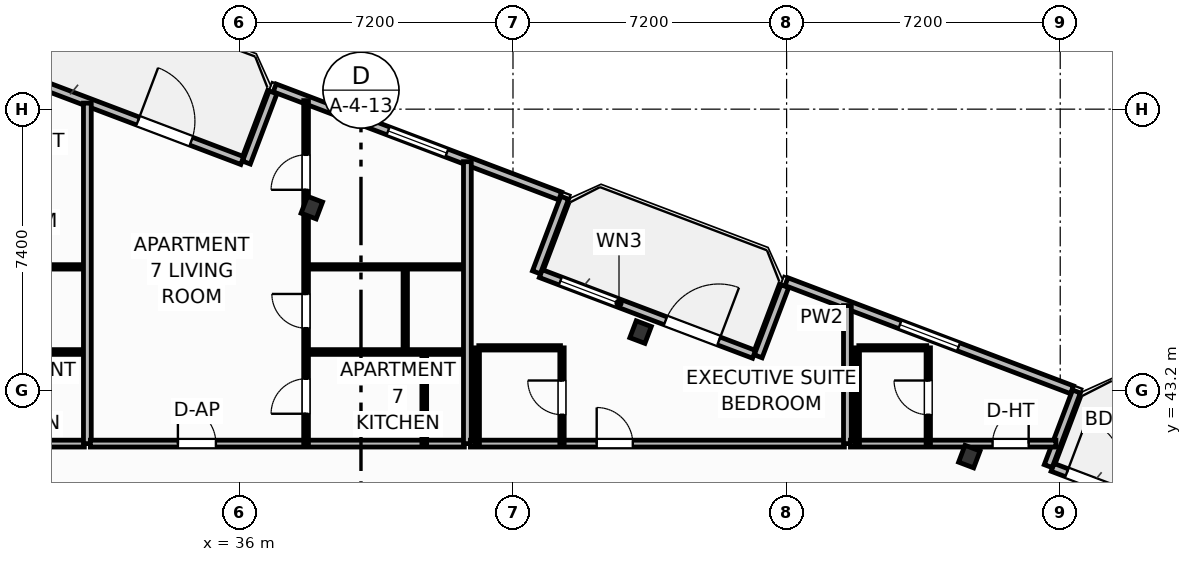
"""IFC4 building model, lengths in metres.
Left out: names, types, materials, properties, quantities, classifications, styles, units other than length and angle.
Written with IfcOpenShell. Run it as: python <this file> out.ifc"""

import sys

from ifc_helpers import new_model, si_unit, direction, frame, frame_2d, origin, origin_2d, place, context, subcontext, project, spatial, rectangle, i_section, extrude, element, fill, save


model = new_model("IFC4")
c1 = context("Model", 3, precision=1e-05, world=origin(), true_north=direction((0.0, 1.0)))
c2 = subcontext(c1, "Body", "Model", "MODEL_VIEW")
j1 = project(units=[si_unit("LENGTHUNIT", "METRE"), si_unit("PLANEANGLEUNIT", "RADIAN")], contexts=[c1])
p1 = place(None, origin())
s1 = spatial("IfcSite", under=j1, at=p1, CompositionType="ELEMENT")
p2 = place(p1, origin())
s2 = spatial("IfcBuilding", under=s1, at=p2, CompositionType="ELEMENT")
p3 = place(p2, frame((0.0, 0.0, 105.8)))
s3 = spatial("IfcBuildingStorey", under=s2, at=p3, CompositionType="ELEMENT", Elevation=105.8)
for number, where, z_axis, x_axis in (
    (1, (55.208, 41.459, 0.0), (0.0, 0.0, 1.0), (0.935, -0.354, 0.0)),
    (2, (46.557, 44.734, 0.0), (0.0, 0.0, 1.0), (0.935, -0.354, 0.0)),
    (3, (37.906, 48.009, 0.0), (0.0, 0.0, 1.0), (0.935, -0.354, 0.0)),
):
    element("IfcColumn", number, at=place(p3, frame(where, z_axis=z_axis, x_axis=x_axis)), inside=s3, PredefinedType="COLUMN", context=c2, shape_type="SweptSolid", body=[
        extrude(i_section(OverallWidth=0.424, OverallDepth=0.474, WebThickness=0.048, FlangeThickness=0.077, FilletRadius=0.025, at=origin_2d()), origin(), (0.0, 0.0, 1.0), 3.7),
    ])
p4 = place(p3, frame((30.465, 51.372, 0.0), z_axis=(0.0, 0.0, 1.0), x_axis=(0.935227640088, -0.354046976001, 0.0)))
e4 = element("IfcWall", 4, at=p4, inside=s3, PredefinedType="SOLIDWALL", context=c2, shape_type="SweptSolid", body=[
    extrude(rectangle(XDim=6.0, YDim=0.22, at=frame_2d((3.0, 0.0))), origin(), (0.0, 0.0, 1.0), 2.73),
])
p5 = place(p4, frame((3.064, 0.0, 0.0)))
e5 = element("IfcOpeningElement", 5, at=p5, cuts=e4, PredefinedType="OPENING", context=c2, shape_type="SweptSolid", body=[
    extrude(rectangle(XDim=1.5, YDim=2.25, at=frame_2d((0.75, 1.125))), frame((0.0, 0.12, 0.0), z_axis=(0.0, -1.0, 0.0), x_axis=(1.0, 0.0, 0.0)), (0.0, 0.0, 1.0), 0.24),
])
p6 = place(p3, frame((43.932, 46.273, 0.0), z_axis=(0.0, 0.0, 1.0), x_axis=(0.93521416643, -0.354082565101, 0.0)))
e6 = element("IfcWall", 6, at=p6, inside=s3, PredefinedType="SOLIDWALL", context=c2, shape_type="SweptSolid", body=[
    extrude(rectangle(XDim=6.0, YDim=0.22, at=frame_2d((3.0, 0.0))), origin(), (0.0, 0.0, 1.0), 2.73),
])
p7 = place(p6, frame((3.508, 0.0, 0.0)))
e7 = element("IfcOpeningElement", 7, at=p7, cuts=e6, PredefinedType="OPENING", context=c2, shape_type="SweptSolid", body=[
    extrude(rectangle(XDim=1.5, YDim=2.25, at=frame_2d((0.75, 1.125))), frame((0.0, 0.12, 0.0), z_axis=(0.0, -1.0, 0.0), x_axis=(1.0, 0.0, 0.0)), (0.0, 0.0, 1.0), 0.24),
])
p8 = place(p6, frame((0.55, 0.0, 0.75)))
e8 = element("IfcOpeningElement", 8, at=p8, cuts=e6, PredefinedType="OPENING", context=c2, shape_type="SweptSolid", body=[
    extrude(rectangle(XDim=1.65, YDim=1.65, at=frame_2d((0.825, 0.825))), frame((0.0, 0.12, 0.0), z_axis=(0.0, -1.0, 0.0), x_axis=(1.0, 0.0, 0.0)), (0.0, 0.0, 1.0), 0.24),
])
p9 = place(p3, frame((57.399, 41.175, 0.0), z_axis=(0.0, 0.0, 1.0), x_axis=(0.935227640088, -0.354046976001, 0.0)))
e9 = element("IfcWall", 9, at=p9, inside=s3, PredefinedType="SOLIDWALL", context=c2, shape_type="SweptSolid", body=[
    extrude(rectangle(XDim=6.0, YDim=0.22, at=frame_2d((3.0, 0.0))), origin(), (0.0, 0.0, 1.0), 2.73),
])
p10 = place(p9, frame((0.4, 0.0, 0.0)))
e10 = element("IfcOpeningElement", 10, at=p10, cuts=e9, PredefinedType="OPENING", context=c2, shape_type="SweptSolid", body=[
    extrude(rectangle(XDim=1.5, YDim=2.25, at=frame_2d((0.75, 1.125))), frame((0.0, 0.12, 0.0), z_axis=(0.0, -1.0, 0.0), x_axis=(1.0, 0.0, 0.0)), (0.0, 0.0, 1.0), 0.24),
])
p11 = place(p3, frame((57.284, 41.208, 0.0), z_axis=(0.0, 0.0, 1.0), x_axis=(0.354128469405, 0.935196785258, 0.0)))
e11 = element("IfcWall", 11, at=p11, inside=s3, PredefinedType="SOLIDWALL", context=c2, shape_type="SweptSolid", body=[
    extrude(rectangle(XDim=2.1, YDim=0.22, at=frame_2d((1.05, 0.0))), origin(), (0.0, 0.0, 1.0), 2.73),
])
p12 = place(p3, frame((57.91, 43.216, 0.0), z_axis=(0.0, 0.0, 1.0), x_axis=(-0.935220736163, 0.354065212427, 0.0)))
e12 = element("IfcWall", 12, at=p12, inside=s3, PredefinedType="SOLIDWALL", context=c2, shape_type="SweptSolid", body=[
    extrude(rectangle(XDim=8.035, YDim=0.22, at=frame_2d((4.018, 0.0))), origin(), (0.0, 0.0, 1.0), 2.73),
])
p13 = place(p12, frame((3.192, 0.0, 0.8)))
e13 = element("IfcOpeningElement", 13, at=p13, cuts=e12, PredefinedType="OPENING", context=c2, shape_type="SweptSolid", body=[
    extrude(rectangle(XDim=1.65, YDim=1.65, at=frame_2d((0.825, 0.825))), frame((0.0, 0.12, 0.0), z_axis=(0.0, -1.0, 0.0), x_axis=(1.0, 0.0, 0.0)), (0.0, 0.0, 1.0), 0.24),
])
p14 = place(p3, frame((50.352, 45.944, 0.0), z_axis=(0.0, 0.0, 1.0), x_axis=(-0.354061611705, -0.935222099352, 0.0)))
e14 = element("IfcWall", 14, at=p14, inside=s3, PredefinedType="SOLIDWALL", context=c2, shape_type="SweptSolid", body=[
    extrude(rectangle(XDim=1.975, YDim=0.22, at=frame_2d((0.987, 0.0))), origin(), (0.0, 0.0, 1.0), 2.73),
])
p15 = place(p3, frame((43.817, 46.306, 0.0), z_axis=(0.0, 0.0, 1.0), x_axis=(0.353988291547, 0.935249854022, 0.0)))
e15 = element("IfcWall", 15, at=p15, inside=s3, PredefinedType="SOLIDWALL", context=c2, shape_type="SweptSolid", body=[
    extrude(rectangle(XDim=2.1, YDim=0.22, at=frame_2d((1.05, 0.0))), origin(), (0.0, 0.0, 1.0), 2.73),
])
p16 = place(p3, frame((44.443, 48.314, 0.0), z_axis=(0.0, 0.0, 1.0), x_axis=(-0.935226988293, 0.354048697735, 0.0)))
e16 = element("IfcWall", 16, at=p16, inside=s3, PredefinedType="SOLIDWALL", context=c2, shape_type="SweptSolid", body=[
    extrude(rectangle(XDim=8.035, YDim=0.22, at=frame_2d((4.018, 0.0))), origin(), (0.0, 0.0, 1.0), 2.73),
])
p17 = place(p16, frame((3.192, 0.0, 0.8)))
e17 = element("IfcOpeningElement", 17, at=p17, cuts=e16, PredefinedType="OPENING", context=c2, shape_type="SweptSolid", body=[
    extrude(rectangle(XDim=1.65, YDim=1.65, at=frame_2d((0.825, 0.825))), frame((0.0, 0.12, 0.0), z_axis=(0.0, -1.0, 0.0), x_axis=(1.0, 0.0, 0.0)), (0.0, 0.0, 1.0), 0.24),
])
p18 = place(p3, frame((36.885, 51.042, 0.0), z_axis=(0.0, 0.0, 1.0), x_axis=(-0.354128791944, -0.935196663123, 0.0)))
e18 = element("IfcWall", 18, at=p18, inside=s3, PredefinedType="SOLIDWALL", context=c2, shape_type="SweptSolid", body=[
    extrude(rectangle(XDim=1.975, YDim=0.22, at=frame_2d((0.988, 0.0))), origin(), (0.0, 0.0, 1.0), 2.73),
])
p19 = place(p3, frame((30.349, 51.405, 0.0), z_axis=(0.0, 0.0, 1.0), x_axis=(0.354128469405, 0.935196785258, 0.0)))
e19 = element("IfcWall", 19, at=p19, inside=s3, PredefinedType="SOLIDWALL", context=c2, shape_type="SweptSolid", body=[
    extrude(rectangle(XDim=2.1, YDim=0.22, at=frame_2d((1.05, 0.0))), origin(), (0.0, 0.0, 1.0), 2.73),
])
p20 = place(p19, frame((0.2, 0.0, 0.8)))
e20 = element("IfcOpeningElement", 20, at=p20, cuts=e19, PredefinedType="OPENING", context=c2, shape_type="SweptSolid", body=[
    extrude(rectangle(XDim=1.15, YDim=1.4, at=frame_2d((0.575, 0.7))), frame((0.0, 0.12, 0.0), z_axis=(0.0, -1.0, 0.0), x_axis=(1.0, 0.0, 0.0)), (0.0, 0.0, 1.0), 0.24),
])
p21 = place(p3, frame((22.08, 41.8, 0.0), z_axis=(0.0, 0.0, 1.0), x_axis=(1.0, 0.0, 0.0)))
e21 = element("IfcWall", 21, at=p21, inside=s3, PredefinedType="PARTITIONING", context=c2, shape_type="SweptSolid", body=[
    extrude(rectangle(XDim=9.84, YDim=0.18, at=frame_2d((4.92, 0.0))), origin(), (0.0, 0.0, 1.0), 3.45),
])
p22 = place(p21, frame((2.302, 0.0, 0.0)))
e22 = element("IfcOpeningElement", 22, at=p22, cuts=e21, PredefinedType="OPENING", context=c2, shape_type="SweptSolid", body=[
    extrude(rectangle(XDim=1.0, YDim=2.2, at=frame_2d((0.5, 1.1))), frame((0.0, 0.1, 0.0), z_axis=(0.0, -1.0, 0.0), x_axis=(1.0, 0.0, 0.0)), (0.0, 0.0, 1.0), 0.2),
])
p23 = place(p3, frame((27.825, 44.21, 0.0), z_axis=(0.0, 0.0, 1.0), x_axis=(1.0, 0.0, 0.0)))
e23 = element("IfcWall", 23, at=p23, inside=s3, PredefinedType="PARTITIONING", context=c2, shape_type="SweptSolid", body=[
    extrude(rectangle(XDim=4.095, YDim=0.125, at=frame_2d((2.047, 0.0))), origin(), (0.0, 0.0, 1.0), 3.45),
])
p24 = place(p3, frame((27.825, 46.45, 0.0), z_axis=(0.0, 0.0, 1.0), x_axis=(1.0, 0.0, 0.0)))
e24 = element("IfcWall", 24, at=p24, inside=s3, PredefinedType="PARTITIONING", context=c2, shape_type="SweptSolid", body=[
    extrude(rectangle(XDim=4.095, YDim=0.115, at=frame_2d((2.047, 0.0))), origin(), (0.0, 0.0, 1.0), 3.45),
])
p25 = place(p3, frame((32.0, 41.8, 0.0), z_axis=(0.0, 0.0, 1.0), x_axis=(0.0, 1.0, 0.0)))
e25 = element("IfcWall", 25, at=p25, inside=s3, PredefinedType="PARTITIONING", context=c2, shape_type="SweptSolid", body=[
    extrude(rectangle(XDim=8.958, YDim=0.205, at=frame_2d((4.479, 0.0))), origin(), (0.0, 0.0, 1.0), 3.45),
])
p26 = place(p3, frame((32.08, 41.8, 0.0), z_axis=(0.0, 0.0, 1.0), x_axis=(1.0, 0.0, 0.0)))
e26 = element("IfcWall", 26, at=p26, inside=s3, PredefinedType="PARTITIONING", context=c2, shape_type="SweptSolid", body=[
    extrude(rectangle(XDim=9.84, YDim=0.18, at=frame_2d((4.92, 0.0))), origin(), (0.0, 0.0, 1.0), 3.45),
])
p27 = place(p26, frame((2.302, 0.0, 0.0)))
e27 = element("IfcOpeningElement", 27, at=p27, cuts=e26, PredefinedType="OPENING", context=c2, shape_type="SweptSolid", body=[
    extrude(rectangle(XDim=1.0, YDim=2.2, at=frame_2d((0.5, 1.1))), frame((0.0, 0.1, 0.0), z_axis=(0.0, -1.0, 0.0), x_axis=(1.0, 0.0, 0.0)), (0.0, 0.0, 1.0), 0.2),
])
p28 = place(p3, frame((37.755, 41.8, 0.0), z_axis=(0.0, 0.0, 1.0), x_axis=(0.0, 1.0, 0.0)))
e28 = element("IfcWall", 28, at=p28, inside=s3, PredefinedType="PARTITIONING", context=c2, shape_type="SweptSolid", body=[
    extrude(rectangle(XDim=9.025, YDim=0.125, at=frame_2d((4.512, 0.0))), origin(), (0.0, 0.0, 1.0), 3.45),
])
p29 = place(p28, frame((0.785, 0.0, 0.0)))
e29 = element("IfcOpeningElement", 29, at=p29, cuts=e28, PredefinedType="OPENING", context=c2, shape_type="SweptSolid", body=[
    extrude(rectangle(XDim=0.92, YDim=2.05, at=frame_2d((0.46, 1.025))), frame((0.0, 0.073, 0.0), z_axis=(0.0, -1.0, 0.0), x_axis=(1.0, 0.0, 0.0)), (0.0, 0.0, 1.0), 0.145),
])
p30 = place(p28, frame((3.037, 0.0, 0.0)))
e30 = element("IfcOpeningElement", 30, at=p30, cuts=e28, PredefinedType="OPENING", context=c2, shape_type="SweptSolid", body=[
    extrude(rectangle(XDim=0.9, YDim=2.05, at=frame_2d((0.45, 1.025))), frame((0.0, 0.073, 0.0), z_axis=(0.0, -1.0, 0.0), x_axis=(1.0, 0.0, 0.0)), (0.0, 0.0, 1.0), 0.145),
])
p31 = place(p28, frame((6.678, 0.0, 0.0)))
e31 = element("IfcOpeningElement", 31, at=p31, cuts=e28, PredefinedType="OPENING", context=c2, shape_type="SweptSolid", body=[
    extrude(rectangle(XDim=0.92, YDim=2.05, at=frame_2d((0.46, 1.025))), frame((0.0, 0.073, 0.0), z_axis=(0.0, -1.0, 0.0), x_axis=(1.0, 0.0, 0.0)), (0.0, 0.0, 1.0), 0.145),
])
p32 = place(p3, frame((37.825, 44.21, 0.0), z_axis=(0.0, 0.0, 1.0), x_axis=(1.0, 0.0, 0.0)))
e32 = element("IfcWall", 32, at=p32, inside=s3, PredefinedType="PARTITIONING", context=c2, shape_type="SweptSolid", body=[
    extrude(rectangle(XDim=4.095, YDim=0.125, at=frame_2d((2.047, 0.0))), origin(), (0.0, 0.0, 1.0), 3.45),
])
p33 = place(p3, frame((37.825, 46.45, 0.0), z_axis=(0.0, 0.0, 1.0), x_axis=(1.0, 0.0, 0.0)))
e33 = element("IfcWall", 33, at=p33, inside=s3, PredefinedType="PARTITIONING", context=c2, shape_type="SweptSolid", body=[
    extrude(rectangle(XDim=4.095, YDim=0.115, at=frame_2d((2.047, 0.0))), origin(), (0.0, 0.0, 1.0), 3.45),
])
p34 = place(p3, frame((40.865, 41.8, 0.0), z_axis=(0.0, 0.0, 1.0), x_axis=(0.0, 1.0, 0.0)))
e34 = element("IfcWall", 34, at=p34, inside=s3, PredefinedType="PARTITIONING", context=c2, shape_type="SweptSolid", body=[
    extrude(rectangle(XDim=2.41, YDim=0.125, at=frame_2d((1.205, 0.0))), origin(), (0.0, 0.0, 1.0), 3.45),
])
p35 = place(p3, frame((40.365, 44.21, 0.0), z_axis=(0.0, 0.0, 1.0), x_axis=(0.0, 1.0, 0.0)))
e35 = element("IfcWall", 35, at=p35, inside=s3, PredefinedType="PARTITIONING", context=c2, shape_type="SweptSolid", body=[
    extrude(rectangle(XDim=2.24, YDim=0.115, at=frame_2d((1.12, 0.0))), origin(), (0.0, 0.0, 1.0), 3.45),
])
p36 = place(p3, frame((42.0, 41.8, 0.0), z_axis=(0.0, 0.0, 1.0), x_axis=(0.0, 1.0, 0.0)))
e36 = element("IfcWall", 36, at=p36, inside=s3, PredefinedType="PARTITIONING", context=c2, shape_type="SweptSolid", body=[
    extrude(rectangle(XDim=7.418, YDim=0.205, at=frame_2d((3.709, 0.0))), origin(), (0.0, 0.0, 1.0), 3.45),
])
p37 = place(p3, frame((42.08, 41.8, 0.0), z_axis=(0.0, 0.0, 1.0), x_axis=(1.0, 0.0, 0.0)))
e37 = element("IfcWall", 37, at=p37, inside=s3, PredefinedType="PARTITIONING", context=c2, shape_type="SweptSolid", body=[
    extrude(rectangle(XDim=9.84, YDim=0.18, at=frame_2d((4.92, 0.0))), origin(), (0.0, 0.0, 1.0), 3.45),
])
p38 = place(p37, frame((3.323, 0.0, 0.0)))
e38 = element("IfcOpeningElement", 38, at=p38, cuts=e37, PredefinedType="OPENING", context=c2, shape_type="SweptSolid", body=[
    extrude(rectangle(XDim=0.95, YDim=2.15, at=frame_2d((0.475, 1.075))), frame((0.0, 0.1, 0.0), z_axis=(0.0, -1.0, 0.0), x_axis=(1.0, 0.0, 0.0)), (0.0, 0.0, 1.0), 0.2),
])
p39 = place(p3, frame((42.3, 44.32, 0.0), z_axis=(0.0, 0.0, 1.0), x_axis=(1.0, 0.0, 0.0)))
e39 = element("IfcWall", 39, at=p39, inside=s3, PredefinedType="PARTITIONING", context=c2, shape_type="SweptSolid", body=[
    extrude(rectangle(XDim=2.15, YDim=0.115, at=frame_2d((1.075, 0.0))), origin(), (0.0, 0.0, 1.0), 3.45),
])
p40 = place(p3, frame((44.49, 41.8, 0.0), z_axis=(0.0, 0.0, 1.0), x_axis=(0.0, 1.0, 0.0)))
e40 = element("IfcWall", 40, at=p40, inside=s3, PredefinedType="PARTITIONING", context=c2, shape_type="SweptSolid", body=[
    extrude(rectangle(XDim=2.52, YDim=0.115, at=frame_2d((1.26, 0.0))), origin(), (0.0, 0.0, 1.0), 3.45),
])
p41 = place(p40, frame((0.76, 0.0, 0.0)))
e41 = element("IfcOpeningElement", 41, at=p41, cuts=e40, PredefinedType="OPENING", context=c2, shape_type="SweptSolid", body=[
    extrude(rectangle(XDim=0.9, YDim=2.05, at=frame_2d((0.45, 1.025))), frame((0.0, 0.067, 0.0), z_axis=(0.0, -1.0, 0.0), x_axis=(1.0, 0.0, 0.0)), (0.0, 0.0, 1.0), 0.135),
])
p42 = place(p3, frame((42.26, 41.8, 0.0), z_axis=(0.0, 0.0, 1.0), x_axis=(0.0, 1.0, 0.0)))
e42 = element("IfcWall", 42, at=p42, inside=s3, PredefinedType="PARTITIONING", context=c2, shape_type="SweptSolid", body=[
    extrude(rectangle(XDim=2.52, YDim=0.115, at=frame_2d((1.26, 0.0))), origin(), (0.0, 0.0, 1.0), 3.45),
])
p43 = place(p3, frame((52.0, 41.8, 0.0), z_axis=(0.0, 0.0, 1.0), x_axis=(0.0, 1.0, 0.0)))
e43 = element("IfcWall", 43, at=p43, inside=s3, PredefinedType="PARTITIONING", context=c2, shape_type="SweptSolid", body=[
    extrude(rectangle(XDim=3.632, YDim=0.205, at=frame_2d((1.816, 0.0))), origin(), (0.0, 0.0, 1.0), 3.45),
])
p44 = place(p3, frame((52.08, 41.8, 0.0), z_axis=(0.0, 0.0, 1.0), x_axis=(1.0, 0.0, 0.0)))
e44 = element("IfcWall", 44, at=p44, inside=s3, PredefinedType="PARTITIONING", context=c2, shape_type="SweptSolid", body=[
    extrude(rectangle(XDim=5.406, YDim=0.18, at=frame_2d((2.703, 0.0))), origin(), (0.0, 0.0, 1.0), 3.45),
])
p45 = place(p44, frame((3.74, 0.0, 0.0)))
e45 = element("IfcOpeningElement", 45, at=p45, cuts=e44, PredefinedType="OPENING", context=c2, shape_type="SweptSolid", body=[
    extrude(rectangle(XDim=0.95, YDim=2.15, at=frame_2d((0.475, 1.075))), frame((0.0, 0.1, 0.0), z_axis=(0.0, -1.0, 0.0), x_axis=(1.0, 0.0, 0.0)), (0.0, 0.0, 1.0), 0.2),
])
p46 = place(p3, frame((52.3, 44.32, 0.0), z_axis=(0.0, 0.0, 1.0), x_axis=(1.0, 0.0, 0.0)))
e46 = element("IfcWall", 46, at=p46, inside=s3, PredefinedType="PARTITIONING", context=c2, shape_type="SweptSolid", body=[
    extrude(rectangle(XDim=1.788, YDim=0.115, at=frame_2d((0.894, 0.0))), origin(), (0.0, 0.0, 1.0), 3.45),
])
p47 = place(p3, frame((54.128, 41.8, 0.0), z_axis=(0.0, 0.0, 1.0), x_axis=(0.0, 1.0, 0.0)))
e47 = element("IfcWall", 47, at=p47, inside=s3, PredefinedType="PARTITIONING", context=c2, shape_type="SweptSolid", body=[
    extrude(rectangle(XDim=2.52, YDim=0.115, at=frame_2d((1.26, 0.0))), origin(), (0.0, 0.0, 1.0), 3.45),
])
p48 = place(p47, frame((0.76, 0.0, 0.0)))
e48 = element("IfcOpeningElement", 48, at=p48, cuts=e47, PredefinedType="OPENING", context=c2, shape_type="SweptSolid", body=[
    extrude(rectangle(XDim=0.9, YDim=2.05, at=frame_2d((0.45, 1.025))), frame((0.0, 0.067, 0.0), z_axis=(0.0, -1.0, 0.0), x_axis=(1.0, 0.0, 0.0)), (0.0, 0.0, 1.0), 0.135),
])
p49 = place(p3, frame((52.26, 41.8, 0.0), z_axis=(0.0, 0.0, 1.0), x_axis=(0.0, 1.0, 0.0)))
e49 = element("IfcWall", 49, at=p49, inside=s3, PredefinedType="PARTITIONING", context=c2, shape_type="SweptSolid", body=[
    extrude(rectangle(XDim=2.52, YDim=0.115, at=frame_2d((1.26, 0.0))), origin(), (0.0, 0.0, 1.0), 3.45),
])
p50 = place(p5, origin())
e50 = element("IfcDoor", 50, at=p50, inside=s3, OperationType="SINGLE_SWING_LEFT", PredefinedType="DOOR", context=c2, shape_type="SweptSolid", body=[
    extrude(rectangle(XDim=1.5, YDim=2.25, at=frame_2d((0.75, 1.125))), frame((0.0, 0.025, 0.0), z_axis=(0.0, -1.0, 0.0), x_axis=(1.0, 0.0, 0.0)), (0.0, 0.0, 1.0), 0.05),
])
fill(e5, e50)
p51 = place(p7, origin())
e51 = element("IfcDoor", 51, at=p51, inside=s3, OperationType="SINGLE_SWING_RIGHT", PredefinedType="DOOR", context=c2, shape_type="SweptSolid", body=[
    extrude(rectangle(XDim=1.5, YDim=2.25, at=frame_2d((0.75, 1.125))), frame((0.0, 0.025, 0.0), z_axis=(0.0, -1.0, 0.0), x_axis=(1.0, 0.0, 0.0)), (0.0, 0.0, 1.0), 0.05),
])
fill(e7, e51)
p52 = place(p8, origin())
e52 = element("IfcWindow", 52, at=p52, inside=s3, PartitioningType="SINGLE_PANEL", PredefinedType="WINDOW", context=c2, shape_type="SweptSolid", body=[
    extrude(rectangle(XDim=1.65, YDim=1.65, at=frame_2d((0.825, 0.825))), frame((0.0, 0.03, 0.0), z_axis=(0.0, -1.0, 0.0), x_axis=(1.0, 0.0, 0.0)), (0.0, 0.0, 1.0), 0.06),
])
fill(e8, e52)
p53 = place(p10, origin())
e53 = element("IfcDoor", 53, at=p53, inside=s3, OperationType="SINGLE_SWING_LEFT", PredefinedType="DOOR", context=c2, shape_type="SweptSolid", body=[
    extrude(rectangle(XDim=1.5, YDim=2.25, at=frame_2d((0.75, 1.125))), frame((0.0, 0.025, 0.0), z_axis=(0.0, -1.0, 0.0), x_axis=(1.0, 0.0, 0.0)), (0.0, 0.0, 1.0), 0.05),
])
fill(e10, e53)
p54 = place(p13, origin())
e54 = element("IfcWindow", 54, at=p54, inside=s3, PartitioningType="SINGLE_PANEL", PredefinedType="WINDOW", context=c2, shape_type="SweptSolid", body=[
    extrude(rectangle(XDim=1.65, YDim=1.65, at=frame_2d((0.825, 0.825))), frame((0.0, 0.03, 0.0), z_axis=(0.0, -1.0, 0.0), x_axis=(1.0, 0.0, 0.0)), (0.0, 0.0, 1.0), 0.06),
])
fill(e13, e54)
p55 = place(p17, origin())
e55 = element("IfcWindow", 55, at=p55, inside=s3, PartitioningType="SINGLE_PANEL", PredefinedType="WINDOW", context=c2, shape_type="SweptSolid", body=[
    extrude(rectangle(XDim=1.65, YDim=1.65, at=frame_2d((0.825, 0.825))), frame((0.0, 0.03, 0.0), z_axis=(0.0, -1.0, 0.0), x_axis=(1.0, 0.0, 0.0)), (0.0, 0.0, 1.0), 0.06),
])
fill(e17, e55)
p56 = place(p27, origin())
e56 = element("IfcDoor", 56, at=p56, inside=s3, OperationType="SINGLE_SWING_LEFT", PredefinedType="DOOR", context=c2, shape_type="SweptSolid", body=[
    extrude(rectangle(XDim=1.0, YDim=2.2, at=frame_2d((0.5, 1.1))), frame((0.0, 0.025, 0.0), z_axis=(0.0, -1.0, 0.0), x_axis=(1.0, 0.0, 0.0)), (0.0, 0.0, 1.0), 0.05),
])
fill(e27, e56)
p57 = place(p29, origin())
e57 = element("IfcDoor", 57, at=p57, inside=s3, OperationType="SINGLE_SWING_LEFT", PredefinedType="DOOR", context=c2, shape_type="SweptSolid", body=[
    extrude(rectangle(XDim=0.92, YDim=2.05, at=frame_2d((0.46, 1.025))), frame((0.0, 0.025, 0.0), z_axis=(0.0, -1.0, 0.0), x_axis=(1.0, 0.0, 0.0)), (0.0, 0.0, 1.0), 0.05),
])
fill(e29, e57)
p58 = place(p30, origin())
e58 = element("IfcDoor", 58, at=p58, inside=s3, OperationType="SINGLE_SWING_RIGHT", PredefinedType="DOOR", context=c2, shape_type="SweptSolid", body=[
    extrude(rectangle(XDim=0.9, YDim=2.05, at=frame_2d((0.45, 1.025))), frame((0.0, 0.025, 0.0), z_axis=(0.0, -1.0, 0.0), x_axis=(1.0, 0.0, 0.0)), (0.0, 0.0, 1.0), 0.05),
])
fill(e30, e58)
p59 = place(p31, origin())
e59 = element("IfcDoor", 59, at=p59, inside=s3, OperationType="SINGLE_SWING_LEFT", PredefinedType="DOOR", context=c2, shape_type="SweptSolid", body=[
    extrude(rectangle(XDim=0.92, YDim=2.05, at=frame_2d((0.46, 1.025))), frame((0.0, 0.025, 0.0), z_axis=(0.0, -1.0, 0.0), x_axis=(1.0, 0.0, 0.0)), (0.0, 0.0, 1.0), 0.05),
])
fill(e31, e59)
p60 = place(p38, origin())
e60 = element("IfcDoor", 60, at=p60, inside=s3, OperationType="SINGLE_SWING_LEFT", PredefinedType="DOOR", context=c2, shape_type="SweptSolid", body=[
    extrude(rectangle(XDim=0.95, YDim=2.15, at=frame_2d((0.475, 1.075))), frame((0.0, 0.025, 0.0), z_axis=(0.0, -1.0, 0.0), x_axis=(1.0, 0.0, 0.0)), (0.0, 0.0, 1.0), 0.05),
])
fill(e38, e60)
p61 = place(p41, origin())
e61 = element("IfcDoor", 61, at=p61, inside=s3, OperationType="SINGLE_SWING_RIGHT", PredefinedType="DOOR", context=c2, shape_type="SweptSolid", body=[
    extrude(rectangle(XDim=0.9, YDim=2.05, at=frame_2d((0.45, 1.025))), frame((0.0, 0.025, 0.0), z_axis=(0.0, -1.0, 0.0), x_axis=(1.0, 0.0, 0.0)), (0.0, 0.0, 1.0), 0.05),
])
fill(e41, e61)
p62 = place(p45, origin())
e62 = element("IfcDoor", 62, at=p62, inside=s3, OperationType="SINGLE_SWING_RIGHT", PredefinedType="DOOR", context=c2, shape_type="SweptSolid", body=[
    extrude(rectangle(XDim=0.95, YDim=2.15, at=frame_2d((0.475, 1.075))), frame((0.0, 0.025, 0.0), z_axis=(0.0, -1.0, 0.0), x_axis=(1.0, 0.0, 0.0)), (0.0, 0.0, 1.0), 0.05),
])
fill(e45, e62)
p63 = place(p48, origin())
e63 = element("IfcDoor", 63, at=p63, inside=s3, OperationType="SINGLE_SWING_RIGHT", PredefinedType="DOOR", context=c2, shape_type="SweptSolid", body=[
    extrude(rectangle(XDim=0.9, YDim=2.05, at=frame_2d((0.45, 1.025))), frame((0.0, 0.025, 0.0), z_axis=(0.0, -1.0, 0.0), x_axis=(1.0, 0.0, 0.0)), (0.0, 0.0, 1.0), 0.05),
])
fill(e48, e63)
save(model, sys.argv[1])
